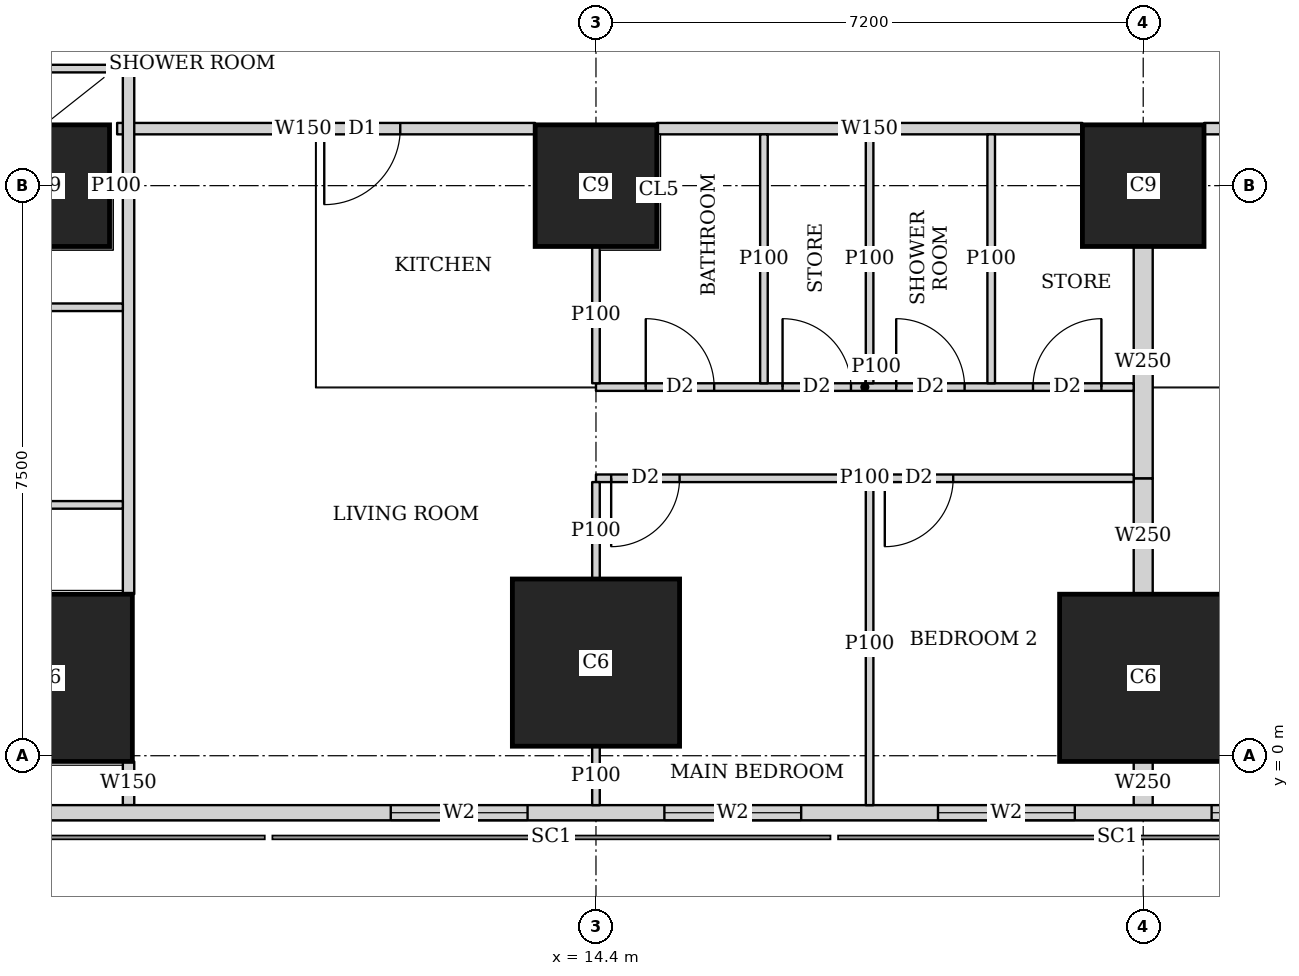
"""IFC4 building model, lengths in metres.
Left out: names, types, materials, properties, quantities, classifications, styles, units other than length and angle.
Written with IfcOpenShell. Run it as: python <this file> out.ifc"""

import sys

from ifc_helpers import new_model, si_unit, direction, frame, frame_2d, origin, origin_2d, place, context, subcontext, project, spatial, rectangle, extrude, element, fill, save


model = new_model("IFC4")
c1 = context("Model", 3, precision=1e-05, world=origin(), true_north=direction((0.0, 1.0)))
c2 = subcontext(c1, "Body", "Model", "MODEL_VIEW")
j1 = project(units=[si_unit("LENGTHUNIT", "METRE"), si_unit("PLANEANGLEUNIT", "RADIAN")], contexts=[c1])
p1 = place(None, origin())
s1 = spatial("IfcSite", under=j1, at=p1, CompositionType="ELEMENT")
p2 = place(p1, origin())
s2 = spatial("IfcBuilding", under=s1, at=p2, CompositionType="ELEMENT")
p3 = place(p2, frame((0.0, 0.0, 122.9)))
s3 = spatial("IfcBuildingStorey", under=s2, at=p3, CompositionType="ELEMENT", Elevation=122.9)
for number, where, z_axis, x_axis in (
    (1, (7.2, 1.025, 0.0), (0.0, 0.0, 1.0), (1.0, 0.0, 0.0)),
    (2, (14.4, 1.225, 0.0), (0.0, 0.0, 1.0), (1.0, 0.0, 0.0)),
    (3, (21.6, 1.025, 0.0), (0.0, 0.0, 1.0), (1.0, 0.0, 0.0)),
):
    element("IfcColumn", number, at=place(p3, frame(where, z_axis=z_axis, x_axis=x_axis)), inside=s3, PredefinedType="COLUMN", context=c2, shape_type="SweptSolid", body=[
        extrude(rectangle(XDim=2.2, YDim=2.2, at=origin_2d()), origin(), (0.0, 0.0, 1.0), 3.75),
    ])
for number, where, z_axis, x_axis in (
    (4, (7.2, 7.5, 0.0), (0.0, 0.0, 1.0), (1.0, 0.0, 0.0)),
    (5, (14.4, 7.5, 0.0), (0.0, 0.0, 1.0), (1.0, 0.0, 0.0)),
    (6, (21.6, 7.5, 0.0), (0.0, 0.0, 1.0), (1.0, 0.0, 0.0)),
):
    element("IfcColumn", number, at=place(p3, frame(where, z_axis=z_axis, x_axis=x_axis)), inside=s3, PredefinedType="COLUMN", context=c2, shape_type="SweptSolid", body=[
        extrude(rectangle(XDim=1.6, YDim=1.6, at=origin_2d()), origin(), (0.0, 0.0, 1.0), 3.75),
    ])
p4 = place(p3, frame((2.163, -0.75, 0.0), z_axis=(0.0, 0.0, 1.0), x_axis=(1.0, 0.0, 0.0)))
e7 = element("IfcWall", 7, at=p4, inside=s3, PredefinedType="SOLIDWALL", context=c2, shape_type="SweptSolid", body=[
    extrude(rectangle(XDim=45.628, YDim=0.2, at=frame_2d((22.814, 0.0))), origin(), (0.0, 0.0, 1.0), 3.5),
])
p5 = place(p4, frame((9.537, 0.0, 0.9)))
e8 = element("IfcOpeningElement", 8, at=p5, cuts=e7, PredefinedType="OPENING", context=c2, shape_type="SweptSolid", body=[
    extrude(rectangle(XDim=1.8, YDim=1.5, at=frame_2d((0.9, 0.75))), frame((0.0, 0.11, 0.0), z_axis=(0.0, -1.0, 0.0), x_axis=(1.0, 0.0, 0.0)), (0.0, 0.0, 1.0), 0.22),
])
p6 = place(p4, frame((13.137, 0.0, 0.9)))
e9 = element("IfcOpeningElement", 9, at=p6, cuts=e7, PredefinedType="OPENING", context=c2, shape_type="SweptSolid", body=[
    extrude(rectangle(XDim=1.8, YDim=1.5, at=frame_2d((0.9, 0.75))), frame((0.0, 0.11, 0.0), z_axis=(0.0, -1.0, 0.0), x_axis=(1.0, 0.0, 0.0)), (0.0, 0.0, 1.0), 0.22),
])
p7 = place(p4, frame((16.737, 0.0, 0.9)))
e10 = element("IfcOpeningElement", 10, at=p7, cuts=e7, PredefinedType="OPENING", context=c2, shape_type="SweptSolid", body=[
    extrude(rectangle(XDim=1.8, YDim=1.5, at=frame_2d((0.9, 0.75))), frame((0.0, 0.11, 0.0), z_axis=(0.0, -1.0, 0.0), x_axis=(1.0, 0.0, 0.0)), (0.0, 0.0, 1.0), 0.22),
])
p8 = place(p4, frame((20.337, 0.0, 0.9)))
e11 = element("IfcOpeningElement", 11, at=p8, cuts=e7, PredefinedType="OPENING", context=c2, shape_type="SweptSolid", body=[
    extrude(rectangle(XDim=1.8, YDim=1.5, at=frame_2d((0.9, 0.75))), frame((0.0, 0.11, 0.0), z_axis=(0.0, -1.0, 0.0), x_axis=(1.0, 0.0, 0.0)), (0.0, 0.0, 1.0), 0.22),
])
p9 = place(p4, frame((23.937, 0.0, 0.9)))
e12 = element("IfcOpeningElement", 12, at=p9, cuts=e7, PredefinedType="OPENING", context=c2, shape_type="SweptSolid", body=[
    extrude(rectangle(XDim=1.8, YDim=1.5, at=frame_2d((0.9, 0.75))), frame((0.0, 0.11, 0.0), z_axis=(0.0, -1.0, 0.0), x_axis=(1.0, 0.0, 0.0)), (0.0, 0.0, 1.0), 0.22),
])
p10 = place(p4, frame((27.537, 0.0, 0.9)))
e13 = element("IfcOpeningElement", 13, at=p10, cuts=e7, PredefinedType="OPENING", context=c2, shape_type="SweptSolid", body=[
    extrude(rectangle(XDim=1.8, YDim=1.5, at=frame_2d((0.9, 0.75))), frame((0.0, 0.11, 0.0), z_axis=(0.0, -1.0, 0.0), x_axis=(1.0, 0.0, 0.0)), (0.0, 0.0, 1.0), 0.22),
])
p11 = place(p4, frame((31.137, 0.0, 0.9)))
e14 = element("IfcOpeningElement", 14, at=p11, cuts=e7, PredefinedType="OPENING", context=c2, shape_type="SweptSolid", body=[
    extrude(rectangle(XDim=1.8, YDim=1.5, at=frame_2d((0.9, 0.75))), frame((0.0, 0.11, 0.0), z_axis=(0.0, -1.0, 0.0), x_axis=(1.0, 0.0, 0.0)), (0.0, 0.0, 1.0), 0.22),
])
p12 = place(p4, frame((34.737, 0.0, 0.9)))
e15 = element("IfcOpeningElement", 15, at=p12, cuts=e7, PredefinedType="OPENING", context=c2, shape_type="SweptSolid", body=[
    extrude(rectangle(XDim=1.8, YDim=1.5, at=frame_2d((0.9, 0.75))), frame((0.0, 0.11, 0.0), z_axis=(0.0, -1.0, 0.0), x_axis=(1.0, 0.0, 0.0)), (0.0, 0.0, 1.0), 0.22),
])
p13 = place(p3, frame((8.25, -0.65, 0.0), z_axis=(0.0, 0.0, 1.0), x_axis=(0.0, 1.0, 0.0)))
e16 = element("IfcWall", 16, at=p13, inside=s3, PredefinedType="SOLIDWALL", context=c2, shape_type="SweptSolid", body=[
    extrude(rectangle(XDim=0.574, YDim=0.15, at=frame_2d((0.287, 0.0))), origin(), (0.0, 0.0, 1.0), 3.5),
])
p14 = place(p3, frame((8.25, 2.126, 0.0), z_axis=(0.0, 0.0, 1.0), x_axis=(0.0, 1.0, 0.0)))
e17 = element("IfcWall", 17, at=p14, inside=s3, PredefinedType="SOLIDWALL", context=c2, shape_type="SweptSolid", body=[
    extrude(rectangle(XDim=40.773, YDim=0.15, at=frame_2d((20.386, 0.0))), origin(), (0.0, 0.0, 1.0), 3.5),
])
p15 = place(p14, frame((10.286, 0.0, 0.0)))
e18 = element("IfcOpeningElement", 18, at=p15, cuts=e17, PredefinedType="OPENING", context=c2, shape_type="SweptSolid", body=[
    extrude(rectangle(XDim=1.0, YDim=2.1, at=frame_2d((0.5, 1.05))), frame((0.0, 0.085, 0.0), z_axis=(0.0, -1.0, 0.0), x_axis=(1.0, 0.0, 0.0)), (0.0, 0.0, 1.0), 0.17),
])
p16 = place(p14, frame((14.461, 0.0, 0.0)))
e19 = element("IfcOpeningElement", 19, at=p16, cuts=e17, PredefinedType="OPENING", context=c2, shape_type="SweptSolid", body=[
    extrude(rectangle(XDim=1.0, YDim=2.1, at=frame_2d((0.5, 1.05))), frame((0.0, 0.085, 0.0), z_axis=(0.0, -1.0, 0.0), x_axis=(1.0, 0.0, 0.0)), (0.0, 0.0, 1.0), 0.17),
])
p17 = place(p14, frame((21.962, 0.0, 0.0)))
e20 = element("IfcOpeningElement", 20, at=p17, cuts=e17, PredefinedType="OPENING", context=c2, shape_type="SweptSolid", body=[
    extrude(rectangle(XDim=1.0, YDim=2.1, at=frame_2d((0.5, 1.05))), frame((0.0, 0.085, 0.0), z_axis=(0.0, -1.0, 0.0), x_axis=(1.0, 0.0, 0.0)), (0.0, 0.0, 1.0), 0.17),
])
p18 = place(p14, frame((29.461, 0.0, 0.0)))
e21 = element("IfcOpeningElement", 21, at=p18, cuts=e17, PredefinedType="OPENING", context=c2, shape_type="SweptSolid", body=[
    extrude(rectangle(XDim=1.0, YDim=2.1, at=frame_2d((0.5, 1.05))), frame((0.0, 0.085, 0.0), z_axis=(0.0, -1.0, 0.0), x_axis=(1.0, 0.0, 0.0)), (0.0, 0.0, 1.0), 0.17),
])
p19 = place(p3, frame((27.999, 8.25, 0.0), z_axis=(0.0, 0.0, 1.0), x_axis=(-1.0, 0.0, 0.0)))
e22 = element("IfcWall", 22, at=p19, inside=s3, PredefinedType="SOLIDWALL", context=c2, shape_type="SweptSolid", body=[
    extrude(rectangle(XDim=5.598, YDim=0.15, at=frame_2d((2.799, 0.0))), origin(), (0.0, 0.0, 1.0), 3.5),
])
p20 = place(p19, frame((3.899, 0.0, 0.0)))
e23 = element("IfcOpeningElement", 23, at=p20, cuts=e22, PredefinedType="OPENING", context=c2, shape_type="SweptSolid", body=[
    extrude(rectangle(XDim=1.0, YDim=2.1, at=frame_2d((0.5, 1.05))), frame((0.0, 0.085, 0.0), z_axis=(0.0, -1.0, 0.0), x_axis=(1.0, 0.0, 0.0)), (0.0, 0.0, 1.0), 0.17),
])
p21 = place(p3, frame((20.799, 8.25, 0.0), z_axis=(0.0, 0.0, 1.0), x_axis=(-1.0, 0.0, 0.0)))
e24 = element("IfcWall", 24, at=p21, inside=s3, PredefinedType="SOLIDWALL", context=c2, shape_type="SweptSolid", body=[
    extrude(rectangle(XDim=5.598, YDim=0.15, at=frame_2d((2.799, 0.0))), origin(), (0.0, 0.0, 1.0), 3.5),
])
p22 = place(p3, frame((13.599, 8.25, 0.0), z_axis=(0.0, 0.0, 1.0), x_axis=(-1.0, 0.0, 0.0)))
e25 = element("IfcWall", 25, at=p22, inside=s3, PredefinedType="SOLIDWALL", context=c2, shape_type="SweptSolid", body=[
    extrude(rectangle(XDim=5.499, YDim=0.15, at=frame_2d((2.75, 0.0))), origin(), (0.0, 0.0, 1.0), 3.5),
])
p23 = place(p22, frame((1.774, 0.0, 0.0)))
e26 = element("IfcOpeningElement", 26, at=p23, cuts=e25, PredefinedType="OPENING", context=c2, shape_type="SweptSolid", body=[
    extrude(rectangle(XDim=1.0, YDim=2.1, at=frame_2d((0.5, 1.05))), frame((0.0, 0.085, 0.0), z_axis=(0.0, -1.0, 0.0), x_axis=(1.0, 0.0, 0.0)), (0.0, 0.0, 1.0), 0.17),
])
p24 = place(p3, frame((8.001, 7.5, 0.0), z_axis=(0.0, 0.0, 1.0), x_axis=(1.0, 0.0, 0.0)))
e27 = element("IfcWall", 27, at=p24, inside=s3, PredefinedType="PARTITIONING", context=c2, shape_type="SweptSolid", body=[
    extrude(rectangle(XDim=0.174, YDim=0.1, at=frame_2d((0.087, 0.0))), origin(), (0.0, 0.0, 1.0), 3.5),
])
for number, where, z_axis, x_axis in (
    (28, (4.9, 9.04, 0.0), (0.0, 0.0, 1.0), (1.0, 0.0, 0.0)),
    (29, (4.9, 5.9, 0.0), (0.0, 0.0, 1.0), (1.0, 0.0, 0.0)),
):
    element("IfcWall", number, at=place(p3, frame(where, z_axis=z_axis, x_axis=x_axis)), inside=s3, PredefinedType="PARTITIONING", context=c2, shape_type="SweptSolid", body=[
        extrude(rectangle(XDim=3.275, YDim=0.1, at=frame_2d((1.638, 0.0))), origin(), (0.0, 0.0, 1.0), 3.5),
    ])
p25 = place(p3, frame((21.475, 3.65, 0.0), z_axis=(0.0, 0.0, 1.0), x_axis=(-1.0, 0.0, 0.0)))
e30 = element("IfcWall", 30, at=p25, inside=s3, PredefinedType="PARTITIONING", context=c2, shape_type="SweptSolid", body=[
    extrude(rectangle(XDim=7.075, YDim=0.1, at=frame_2d((3.538, 0.0))), origin(), (0.0, 0.0, 1.0), 3.5),
])
p26 = place(p25, frame((5.975, 0.0, 0.0)))
e31 = element("IfcOpeningElement", 31, at=p26, cuts=e30, PredefinedType="OPENING", context=c2, shape_type="SweptSolid", body=[
    extrude(rectangle(XDim=0.9, YDim=2.1, at=frame_2d((0.45, 1.05))), frame((0.0, 0.06, 0.0), z_axis=(0.0, -1.0, 0.0), x_axis=(1.0, 0.0, 0.0)), (0.0, 0.0, 1.0), 0.12),
])
p27 = place(p25, frame((2.375, 0.0, 0.0)))
e32 = element("IfcOpeningElement", 32, at=p27, cuts=e30, PredefinedType="OPENING", context=c2, shape_type="SweptSolid", body=[
    extrude(rectangle(XDim=0.9, YDim=2.1, at=frame_2d((0.45, 1.05))), frame((0.0, 0.06, 0.0), z_axis=(0.0, -1.0, 0.0), x_axis=(1.0, 0.0, 0.0)), (0.0, 0.0, 1.0), 0.12),
])
p28 = place(p3, frame((21.475, 4.85, 0.0), z_axis=(0.0, 0.0, 1.0), x_axis=(-1.0, 0.0, 0.0)))
e33 = element("IfcWall", 33, at=p28, inside=s3, PredefinedType="PARTITIONING", context=c2, shape_type="SweptSolid", body=[
    extrude(rectangle(XDim=7.075, YDim=0.1, at=frame_2d((3.538, 0.0))), origin(), (0.0, 0.0, 1.0), 3.5),
])
p29 = place(p28, frame((5.52, 0.0, 0.0)))
e34 = element("IfcOpeningElement", 34, at=p29, cuts=e33, PredefinedType="OPENING", context=c2, shape_type="SweptSolid", body=[
    extrude(rectangle(XDim=0.9, YDim=2.1, at=frame_2d((0.45, 1.05))), frame((0.0, 0.06, 0.0), z_axis=(0.0, -1.0, 0.0), x_axis=(1.0, 0.0, 0.0)), (0.0, 0.0, 1.0), 0.12),
])
p30 = place(p28, frame((2.225, 0.0, 0.0)))
e35 = element("IfcOpeningElement", 35, at=p30, cuts=e33, PredefinedType="OPENING", context=c2, shape_type="SweptSolid", body=[
    extrude(rectangle(XDim=0.9, YDim=2.1, at=frame_2d((0.45, 1.05))), frame((0.0, 0.06, 0.0), z_axis=(0.0, -1.0, 0.0), x_axis=(1.0, 0.0, 0.0)), (0.0, 0.0, 1.0), 0.12),
])
p31 = place(p28, frame((3.72, 0.0, 0.0)))
e36 = element("IfcOpeningElement", 36, at=p31, cuts=e33, PredefinedType="OPENING", context=c2, shape_type="SweptSolid", body=[
    extrude(rectangle(XDim=0.9, YDim=2.1, at=frame_2d((0.45, 1.05))), frame((0.0, 0.06, 0.0), z_axis=(0.0, -1.0, 0.0), x_axis=(1.0, 0.0, 0.0)), (0.0, 0.0, 1.0), 0.12),
])
p32 = place(p28, frame((0.425, 0.0, 0.0)))
e37 = element("IfcOpeningElement", 37, at=p32, cuts=e33, PredefinedType="OPENING", context=c2, shape_type="SweptSolid", body=[
    extrude(rectangle(XDim=0.9, YDim=2.1, at=frame_2d((0.45, 1.05))), frame((0.0, 0.06, 0.0), z_axis=(0.0, -1.0, 0.0), x_axis=(1.0, 0.0, 0.0)), (0.0, 0.0, 1.0), 0.12),
])
p33 = place(p3, frame((14.4, -0.65, 0.0), z_axis=(0.0, 0.0, 1.0), x_axis=(0.0, 1.0, 0.0)))
e38 = element("IfcWall", 38, at=p33, inside=s3, PredefinedType="PARTITIONING", context=c2, shape_type="SweptSolid", body=[
    extrude(rectangle(XDim=0.774, YDim=0.1, at=frame_2d((0.387, 0.0))), origin(), (0.0, 0.0, 1.0), 3.5),
])
p34 = place(p3, frame((14.4, 2.326, 0.0), z_axis=(0.0, 0.0, 1.0), x_axis=(0.0, 1.0, 0.0)))
e39 = element("IfcWall", 39, at=p34, inside=s3, PredefinedType="PARTITIONING", context=c2, shape_type="SweptSolid", body=[
    extrude(rectangle(XDim=1.274, YDim=0.1, at=frame_2d((0.637, 0.0))), origin(), (0.0, 0.0, 1.0), 3.5),
])
p35 = place(p3, frame((18.0, -0.65, 0.0), z_axis=(0.0, 0.0, 1.0), x_axis=(0.0, 1.0, 0.0)))
e40 = element("IfcWall", 40, at=p35, inside=s3, PredefinedType="PARTITIONING", context=c2, shape_type="SweptSolid", body=[
    extrude(rectangle(XDim=4.25, YDim=0.1, at=frame_2d((2.125, 0.0))), origin(), (0.0, 0.0, 1.0), 2.2),
])
p36 = place(p3, frame((14.4, 4.9, 0.0), z_axis=(0.0, 0.0, 1.0), x_axis=(0.0, 1.0, 0.0)))
e41 = element("IfcWall", 41, at=p36, inside=s3, PredefinedType="PARTITIONING", context=c2, shape_type="SweptSolid", body=[
    extrude(rectangle(XDim=1.799, YDim=0.1, at=frame_2d((0.899, 0.0))), origin(), (0.0, 0.0, 1.0), 3.5),
])
for number, where, z_axis, x_axis in (
    (42, (18.0, 4.9, 0.0), (0.0, 0.0, 1.0), (0.0, 1.0, 0.0)),
    (43, (16.61, 4.9, 0.0), (0.0, 0.0, 1.0), (0.0, 1.0, 0.0)),
    (44, (19.6, 4.9, 0.0), (0.0, 0.0, 1.0), (0.0, 1.0, 0.0)),
):
    element("IfcWall", number, at=place(p3, frame(where, z_axis=z_axis, x_axis=x_axis)), inside=s3, PredefinedType="PARTITIONING", context=c2, shape_type="SweptSolid", body=[
        extrude(rectangle(XDim=3.275, YDim=0.1, at=frame_2d((1.638, 0.0))), origin(), (0.0, 0.0, 1.0), 3.5),
    ])
p37 = place(p3, frame((21.6, -0.65, 0.0), z_axis=(0.0, 0.0, 1.0), x_axis=(0.0, 1.0, 0.0)))
e45 = element("IfcWall", 45, at=p37, inside=s3, PredefinedType="SOLIDWALL", context=c2, shape_type="SweptSolid", body=[
    extrude(rectangle(XDim=0.574, YDim=0.25, at=frame_2d((0.287, 0.0))), origin(), (0.0, 0.0, 1.0), 3.5),
])
p38 = place(p3, frame((21.6, 2.126, 0.0), z_axis=(0.0, 0.0, 1.0), x_axis=(0.0, 1.0, 0.0)))
e46 = element("IfcWall", 46, at=p38, inside=s3, PredefinedType="SOLIDWALL", context=c2, shape_type="SweptSolid", body=[
    extrude(rectangle(XDim=1.524, YDim=0.25, at=frame_2d((0.762, 0.0))), origin(), (0.0, 0.0, 1.0), 3.5),
])
p39 = place(p3, frame((21.6, 3.65, 0.0), z_axis=(0.0, 0.0, 1.0), x_axis=(0.0, 1.0, 0.0)))
e47 = element("IfcWall", 47, at=p39, inside=s3, PredefinedType="SOLIDWALL", context=c2, shape_type="SweptSolid", body=[
    extrude(rectangle(XDim=3.049, YDim=0.25, at=frame_2d((1.524, 0.0))), origin(), (0.0, 0.0, 1.0), 3.5),
])
p40 = place(p3, frame((8.175, 3.3, 0.0), z_axis=(0.0, 0.0, 1.0), x_axis=(-1.0, 0.0, 0.0)))
e48 = element("IfcWall", 48, at=p40, inside=s3, PredefinedType="PARTITIONING", context=c2, shape_type="SweptSolid", body=[
    extrude(rectangle(XDim=3.275, YDim=0.1, at=frame_2d((1.638, 0.0))), origin(), (0.0, 0.0, 1.0), 3.5),
])
p41 = place(p40, frame((2.1, 0.0, 0.0)))
e49 = element("IfcOpeningElement", 49, at=p41, cuts=e48, PredefinedType="OPENING", context=c2, shape_type="SweptSolid", body=[
    extrude(rectangle(XDim=0.9, YDim=2.1, at=frame_2d((0.45, 1.05))), frame((0.0, 0.06, 0.0), z_axis=(0.0, -1.0, 0.0), x_axis=(1.0, 0.0, 0.0)), (0.0, 0.0, 1.0), 0.12),
])
p42 = place(p5, origin())
e50 = element("IfcWindow", 50, at=p42, inside=s3, PartitioningType="SINGLE_PANEL", PredefinedType="WINDOW", context=c2, shape_type="SweptSolid", body=[
    extrude(rectangle(XDim=1.8, YDim=1.5, at=frame_2d((0.9, 0.75))), frame((0.0, 0.03, 0.0), z_axis=(0.0, -1.0, 0.0), x_axis=(1.0, 0.0, 0.0)), (0.0, 0.0, 1.0), 0.06),
])
fill(e8, e50)
p43 = place(p6, origin())
e51 = element("IfcWindow", 51, at=p43, inside=s3, PartitioningType="SINGLE_PANEL", PredefinedType="WINDOW", context=c2, shape_type="SweptSolid", body=[
    extrude(rectangle(XDim=1.8, YDim=1.5, at=frame_2d((0.9, 0.75))), frame((0.0, 0.03, 0.0), z_axis=(0.0, -1.0, 0.0), x_axis=(1.0, 0.0, 0.0)), (0.0, 0.0, 1.0), 0.06),
])
fill(e9, e51)
p44 = place(p7, origin())
e52 = element("IfcWindow", 52, at=p44, inside=s3, PartitioningType="SINGLE_PANEL", PredefinedType="WINDOW", context=c2, shape_type="SweptSolid", body=[
    extrude(rectangle(XDim=1.8, YDim=1.5, at=frame_2d((0.9, 0.75))), frame((0.0, 0.03, 0.0), z_axis=(0.0, -1.0, 0.0), x_axis=(1.0, 0.0, 0.0)), (0.0, 0.0, 1.0), 0.06),
])
fill(e10, e52)
p45 = place(p8, origin())
e53 = element("IfcWindow", 53, at=p45, inside=s3, PartitioningType="SINGLE_PANEL", PredefinedType="WINDOW", context=c2, shape_type="SweptSolid", body=[
    extrude(rectangle(XDim=1.8, YDim=1.5, at=frame_2d((0.9, 0.75))), frame((0.0, 0.03, 0.0), z_axis=(0.0, -1.0, 0.0), x_axis=(1.0, 0.0, 0.0)), (0.0, 0.0, 1.0), 0.06),
])
fill(e11, e53)
p46 = place(p26, origin())
e54 = element("IfcDoor", 54, at=p46, inside=s3, OperationType="SINGLE_SWING_RIGHT", PredefinedType="DOOR", context=c2, shape_type="SweptSolid", body=[
    extrude(rectangle(XDim=0.9, YDim=2.1, at=frame_2d((0.45, 1.05))), frame((0.0, 0.025, 0.0), z_axis=(0.0, -1.0, 0.0), x_axis=(1.0, 0.0, 0.0)), (0.0, 0.0, 1.0), 0.05),
])
fill(e31, e54)
p47 = place(p27, origin())
e55 = element("IfcDoor", 55, at=p47, inside=s3, OperationType="SINGLE_SWING_RIGHT", PredefinedType="DOOR", context=c2, shape_type="SweptSolid", body=[
    extrude(rectangle(XDim=0.9, YDim=2.1, at=frame_2d((0.45, 1.05))), frame((0.0, 0.025, 0.0), z_axis=(0.0, -1.0, 0.0), x_axis=(1.0, 0.0, 0.0)), (0.0, 0.0, 1.0), 0.05),
])
fill(e32, e55)
p48 = place(p29, origin())
e56 = element("IfcDoor", 56, at=p48, inside=s3, OperationType="SINGLE_SWING_LEFT", PredefinedType="DOOR", context=c2, shape_type="SweptSolid", body=[
    extrude(rectangle(XDim=0.9, YDim=2.1, at=frame_2d((0.45, 1.05))), frame((0.0, 0.025, 0.0), z_axis=(0.0, -1.0, 0.0), x_axis=(1.0, 0.0, 0.0)), (0.0, 0.0, 1.0), 0.05),
])
fill(e34, e56)
p49 = place(p30, origin())
e57 = element("IfcDoor", 57, at=p49, inside=s3, OperationType="SINGLE_SWING_LEFT", PredefinedType="DOOR", context=c2, shape_type="SweptSolid", body=[
    extrude(rectangle(XDim=0.9, YDim=2.1, at=frame_2d((0.45, 1.05))), frame((0.0, 0.025, 0.0), z_axis=(0.0, -1.0, 0.0), x_axis=(1.0, 0.0, 0.0)), (0.0, 0.0, 1.0), 0.05),
])
fill(e35, e57)
p50 = place(p31, origin())
e58 = element("IfcDoor", 58, at=p50, inside=s3, OperationType="SINGLE_SWING_LEFT", PredefinedType="DOOR", context=c2, shape_type="SweptSolid", body=[
    extrude(rectangle(XDim=0.9, YDim=2.1, at=frame_2d((0.45, 1.05))), frame((0.0, 0.025, 0.0), z_axis=(0.0, -1.0, 0.0), x_axis=(1.0, 0.0, 0.0)), (0.0, 0.0, 1.0), 0.05),
])
fill(e36, e58)
p51 = place(p32, origin())
e59 = element("IfcDoor", 59, at=p51, inside=s3, OperationType="SINGLE_SWING_RIGHT", PredefinedType="DOOR", context=c2, shape_type="SweptSolid", body=[
    extrude(rectangle(XDim=0.9, YDim=2.1, at=frame_2d((0.45, 1.05))), frame((0.0, 0.025, 0.0), z_axis=(0.0, -1.0, 0.0), x_axis=(1.0, 0.0, 0.0)), (0.0, 0.0, 1.0), 0.05),
])
fill(e37, e59)
p52 = place(p23, origin())
e60 = element("IfcDoor", 60, at=p52, inside=s3, OperationType="SINGLE_SWING_RIGHT", PredefinedType="DOOR", context=c2, shape_type="SweptSolid", body=[
    extrude(rectangle(XDim=1.0, YDim=2.1, at=frame_2d((0.5, 1.05))), frame((0.0, 0.025, 0.0), z_axis=(0.0, -1.0, 0.0), x_axis=(1.0, 0.0, 0.0)), (0.0, 0.0, 1.0), 0.05),
])
fill(e26, e60)
save(model, sys.argv[1])
